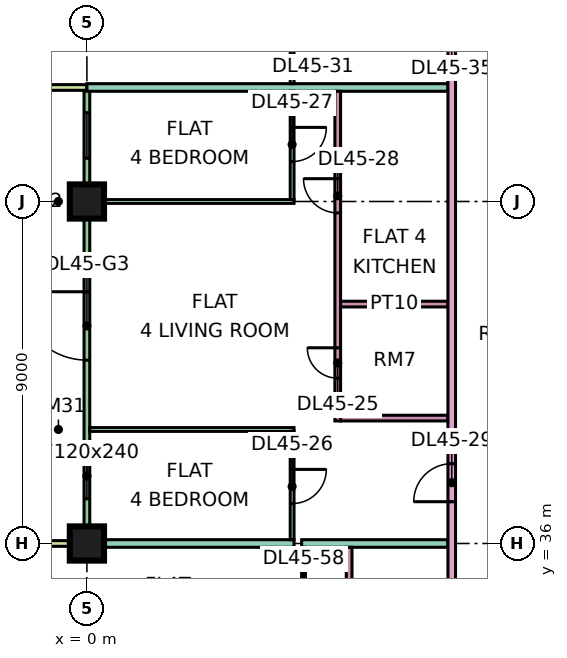
"""IFC4 building model, lengths in metres.
Left out: names, types, materials, properties, quantities, classifications, styles, units other than length and angle.
Written with IfcOpenShell. Run it as: python <this file> out.ifc"""

import sys

from ifc_helpers import new_model, si_unit, direction, frame, frame_2d, origin, origin_2d, place, context, subcontext, project, spatial, rectangle, extrude, element, fill, save


model = new_model("IFC4")
c1 = context("Model", 3, precision=1e-05, world=origin(), true_north=direction((0.0, 1.0)))
c2 = subcontext(c1, "Body", "Model", "MODEL_VIEW")
j1 = project(units=[si_unit("LENGTHUNIT", "METRE"), si_unit("PLANEANGLEUNIT", "RADIAN")], contexts=[c1])
p1 = place(None, origin())
s1 = spatial("IfcSite", under=j1, at=p1, CompositionType="ELEMENT")
p2 = place(p1, origin())
s2 = spatial("IfcBuilding", under=s1, at=p2, CompositionType="ELEMENT")
p3 = place(p2, frame((0.0, 0.0, 194.9)))
s3 = spatial("IfcBuildingStorey", under=s2, at=p3, CompositionType="ELEMENT", Elevation=194.9)
p4 = place(p3, frame((0.0, 36.0, 0.0), z_axis=(0.0, 0.0, 1.0), x_axis=(1.0, 0.0, 0.0)))
e1 = element("IfcColumn", 1, at=p4, inside=s3, PredefinedType="COLUMN", context=c2, shape_type="SweptSolid", body=[
    extrude(rectangle(XDim=0.9, YDim=0.9, at=origin_2d()), origin(), (0.0, 0.0, 1.0), 3.75),
])
p5 = place(p3, frame((0.0, 45.0, 0.0), z_axis=(0.0, 0.0, 1.0), x_axis=(1.0, 0.0, 0.0)))
e2 = element("IfcColumn", 2, at=p5, inside=s3, PredefinedType="COLUMN", context=c2, shape_type="SweptSolid", body=[
    extrude(rectangle(XDim=0.9, YDim=0.9, at=origin_2d()), origin(), (0.0, 0.0, 1.0), 3.75),
])
p6 = place(p3, frame((0.0, 47.925, 0.0), z_axis=(0.0, 0.0, 1.0), x_axis=(0.0, -1.0, 0.0)))
e3 = element("IfcWall", 3, at=p6, inside=s3, PredefinedType="SOLIDWALL", context=c2, shape_type="SweptSolid", body=[
    extrude(rectangle(XDim=11.85, YDim=0.15, at=frame_2d((5.925, 0.0))), origin(), (0.0, 0.0, 1.0), 3.35),
])
p7 = place(p6, frame((0.587, 0.0, 0.45)))
e4 = element("IfcOpeningElement", 4, at=p7, cuts=e3, PredefinedType="OPENING", context=c2, shape_type="SweptSolid", body=[
    extrude(rectangle(XDim=1.2, YDim=2.4, at=frame_2d((0.6, 1.2))), frame((0.0, 0.085, 0.0), z_axis=(0.0, -1.0, 0.0), x_axis=(1.0, 0.0, 0.0)), (0.0, 0.0, 1.0), 0.17),
])
p8 = place(p6, frame((5.3, 0.0, 0.0)))
e5 = element("IfcOpeningElement", 5, at=p8, cuts=e3, PredefinedType="OPENING", context=c2, shape_type="SweptSolid", body=[
    extrude(rectangle(XDim=1.8, YDim=2.4, at=frame_2d((0.9, 1.2))), frame((0.0, 0.085, 0.0), z_axis=(0.0, -1.0, 0.0), x_axis=(1.0, 0.0, 0.0)), (0.0, 0.0, 1.0), 0.17),
])
p9 = place(p6, frame((9.55, 0.0, 0.45)))
e6 = element("IfcOpeningElement", 6, at=p9, cuts=e3, PredefinedType="OPENING", context=c2, shape_type="SweptSolid", body=[
    extrude(rectangle(XDim=1.2, YDim=2.4, at=frame_2d((0.6, 1.2))), frame((0.0, 0.085, 0.0), z_axis=(0.0, -1.0, 0.0), x_axis=(1.0, 0.0, 0.0)), (0.0, 0.0, 1.0), 0.17),
])
for number, where, z_axis, x_axis in (
    (7, (-1.5, 48.0, 0.0), (0.0, 0.0, 1.0), (1.0, 0.0, 0.0)),
    (8, (-1.5, 36.0, 0.0), (0.0, 0.0, 1.0), (1.0, 0.0, 0.0)),
):
    element("IfcWall", number, at=place(p3, frame(where, z_axis=z_axis, x_axis=x_axis)), inside=s3, PredefinedType="SOLIDWALL", context=c2, shape_type="SweptSolid", body=[
        extrude(rectangle(XDim=1.5, YDim=0.15, at=frame_2d((0.75, 0.0))), origin(), (0.0, 0.0, 1.0), 3.35),
    ])
e9 = element("IfcWall", 9, at=p4, inside=s3, PredefinedType="PARTITIONING", context=c2, shape_type="SweptSolid", body=[
    extrude(rectangle(XDim=5.45, YDim=0.2, at=frame_2d((2.725, 0.0))), origin(), (0.0, 0.0, 1.0), 3.35),
])
p10 = place(p3, frame((0.0, 48.0, 0.0), z_axis=(0.0, 0.0, 1.0), x_axis=(1.0, 0.0, 0.0)))
e10 = element("IfcWall", 10, at=p10, inside=s3, PredefinedType="PARTITIONING", context=c2, shape_type="SweptSolid", body=[
    extrude(rectangle(XDim=9.5, YDim=0.2, at=frame_2d((4.75, 0.0))), origin(), (0.0, 0.0, 1.0), 3.35),
])
for number, where, z_axis, x_axis in (
    (11, (0.074, 39.0, 0.0), (0.0, 0.0, 1.0), (1.0, 0.0, 0.0)),
    (12, (0.074, 45.0, 0.0), (0.0, 0.0, 1.0), (1.0, 0.0, 0.0)),
):
    element("IfcWall", number, at=place(p3, frame(where, z_axis=z_axis, x_axis=x_axis)), inside=s3, PredefinedType="PARTITIONING", context=c2, shape_type="SweptSolid", body=[
        extrude(rectangle(XDim=5.376, YDim=0.1, at=frame_2d((2.688, 0.0))), origin(), (0.0, 0.0, 1.0), 3.35),
    ])
p11 = place(p3, frame((5.4, 36.1, 0.0), z_axis=(0.0, 0.0, 1.0), x_axis=(0.0, 1.0, 0.0)))
e13 = element("IfcWall", 13, at=p11, inside=s3, PredefinedType="PARTITIONING", context=c2, shape_type="SweptSolid", body=[
    extrude(rectangle(XDim=2.85, YDim=0.1, at=frame_2d((1.425, 0.0))), origin(), (0.0, 0.0, 1.0), 3.35),
])
p12 = place(p11, frame((0.95, 0.0, 0.0)))
e14 = element("IfcOpeningElement", 14, at=p12, cuts=e13, PredefinedType="OPENING", context=c2, shape_type="SweptSolid", body=[
    extrude(rectangle(XDim=0.9, YDim=2.1, at=frame_2d((0.45, 1.05))), frame((0.0, 0.06, 0.0), z_axis=(0.0, -1.0, 0.0), x_axis=(1.0, 0.0, 0.0)), (0.0, 0.0, 1.0), 0.12),
])
p13 = place(p3, frame((5.4, 45.05, 0.0), z_axis=(0.0, 0.0, 1.0), x_axis=(0.0, 1.0, 0.0)))
e15 = element("IfcWall", 15, at=p13, inside=s3, PredefinedType="PARTITIONING", context=c2, shape_type="SweptSolid", body=[
    extrude(rectangle(XDim=2.85, YDim=0.1, at=frame_2d((1.425, 0.0))), origin(), (0.0, 0.0, 1.0), 3.35),
])
p14 = place(p13, frame((1.0, 0.0, 0.0)))
e16 = element("IfcOpeningElement", 16, at=p14, cuts=e15, PredefinedType="OPENING", context=c2, shape_type="SweptSolid", body=[
    extrude(rectangle(XDim=0.9, YDim=2.1, at=frame_2d((0.45, 1.05))), frame((0.0, 0.06, 0.0), z_axis=(0.0, -1.0, 0.0), x_axis=(1.0, 0.0, 0.0)), (0.0, 0.0, 1.0), 0.12),
])
p15 = place(p3, frame((5.4, 48.1, 0.0), z_axis=(0.0, 0.0, 1.0), x_axis=(0.0, 1.0, 0.0)))
e17 = element("IfcWall", 17, at=p15, inside=s3, PredefinedType="PARTITIONING", context=c2, shape_type="SweptSolid", body=[
    extrude(rectangle(XDim=2.85, YDim=0.1, at=frame_2d((1.425, 0.0))), origin(), (0.0, 0.0, 1.0), 3.35),
])
p16 = place(p15, frame((0.95, 0.0, 0.0)))
e18 = element("IfcOpeningElement", 18, at=p16, cuts=e17, PredefinedType="OPENING", context=c2, shape_type="SweptSolid", body=[
    extrude(rectangle(XDim=0.9, YDim=2.1, at=frame_2d((0.45, 1.05))), frame((0.0, 0.06, 0.0), z_axis=(0.0, -1.0, 0.0), x_axis=(1.0, 0.0, 0.0)), (0.0, 0.0, 1.0), 0.12),
])
p17 = place(p3, frame((5.65, 36.0, 0.0), z_axis=(0.0, 0.0, 1.0), x_axis=(1.0, 0.0, 0.0)))
e19 = element("IfcWall", 19, at=p17, inside=s3, PredefinedType="PARTITIONING", context=c2, shape_type="SweptSolid", body=[
    extrude(rectangle(XDim=3.85, YDim=0.2, at=frame_2d((1.925, 0.0))), origin(), (0.0, 0.0, 1.0), 3.35),
])
p18 = place(p3, frame((5.7, 33.05, 0.0), z_axis=(0.0, 0.0, 1.0), x_axis=(0.0, 1.0, 0.0)))
e20 = element("IfcWall", 20, at=p18, inside=s3, PredefinedType="PARTITIONING", context=c2, shape_type="SweptSolid", body=[
    extrude(rectangle(XDim=2.85, YDim=0.1, at=frame_2d((1.425, 0.0))), origin(), (0.0, 0.0, 1.0), 3.35),
])
p19 = place(p18, frame((1.0, 0.0, 0.0)))
e21 = element("IfcOpeningElement", 21, at=p19, cuts=e20, PredefinedType="OPENING", context=c2, shape_type="SweptSolid", body=[
    extrude(rectangle(XDim=0.9, YDim=2.1, at=frame_2d((0.45, 1.05))), frame((0.0, 0.06, 0.0), z_axis=(0.0, -1.0, 0.0), x_axis=(1.0, 0.0, 0.0)), (0.0, 0.0, 1.0), 0.12),
])
p20 = place(p3, frame((6.6, 39.225, 0.0), z_axis=(0.0, 0.0, 1.0), x_axis=(0.0, 1.0, 0.0)))
e22 = element("IfcWall", 22, at=p20, inside=s3, PredefinedType="PARTITIONING", context=c2, shape_type="SweptSolid", body=[
    extrude(rectangle(XDim=8.675, YDim=0.15, at=frame_2d((4.337, 0.0))), origin(), (0.0, 0.0, 1.0), 3.35),
])
p21 = place(p20, frame((1.125, 0.0, 0.0)))
e23 = element("IfcOpeningElement", 23, at=p21, cuts=e22, PredefinedType="OPENING", context=c2, shape_type="SweptSolid", body=[
    extrude(rectangle(XDim=0.8, YDim=2.1, at=frame_2d((0.4, 1.05))), frame((0.0, 0.085, 0.0), z_axis=(0.0, -1.0, 0.0), x_axis=(1.0, 0.0, 0.0)), (0.0, 0.0, 1.0), 0.17),
])
p22 = place(p20, frame((5.475, 0.0, 0.0)))
e24 = element("IfcOpeningElement", 24, at=p22, cuts=e22, PredefinedType="OPENING", context=c2, shape_type="SweptSolid", body=[
    extrude(rectangle(XDim=0.9, YDim=2.1, at=frame_2d((0.45, 1.05))), frame((0.0, 0.085, 0.0), z_axis=(0.0, -1.0, 0.0), x_axis=(1.0, 0.0, 0.0)), (0.0, 0.0, 1.0), 0.17),
])
for number, where, z_axis, x_axis in (
    (25, (6.675, 39.3, 0.0), (0.0, 0.0, 1.0), (1.0, 0.0, 0.0)),
    (26, (6.675, 42.3, 0.0), (0.0, 0.0, 1.0), (1.0, 0.0, 0.0)),
):
    element("IfcWall", number, at=place(p3, frame(where, z_axis=z_axis, x_axis=x_axis)), inside=s3, PredefinedType="PARTITIONING", context=c2, shape_type="SweptSolid", body=[
        extrude(rectangle(XDim=2.825, YDim=0.15, at=frame_2d((1.413, 0.0))), origin(), (0.0, 0.0, 1.0), 3.35),
    ])
p23 = place(p3, frame((6.9, 27.225, 0.0), z_axis=(0.0, 0.0, 1.0), x_axis=(0.0, 1.0, 0.0)))
e27 = element("IfcWall", 27, at=p23, inside=s3, PredefinedType="PARTITIONING", context=c2, shape_type="SweptSolid", body=[
    extrude(rectangle(XDim=8.675, YDim=0.15, at=frame_2d((4.337, 0.0))), origin(), (0.0, 0.0, 1.0), 3.35),
])
p24 = place(p23, frame((1.125, 0.0, 0.0)))
e28 = element("IfcOpeningElement", 28, at=p24, cuts=e27, PredefinedType="OPENING", context=c2, shape_type="SweptSolid", body=[
    extrude(rectangle(XDim=0.8, YDim=2.1, at=frame_2d((0.4, 1.05))), frame((0.0, 0.085, 0.0), z_axis=(0.0, -1.0, 0.0), x_axis=(1.0, 0.0, 0.0)), (0.0, 0.0, 1.0), 0.17),
])
p25 = place(p23, frame((5.475, 0.0, 0.0)))
e29 = element("IfcOpeningElement", 29, at=p25, cuts=e27, PredefinedType="OPENING", context=c2, shape_type="SweptSolid", body=[
    extrude(rectangle(XDim=0.9, YDim=2.1, at=frame_2d((0.45, 1.05))), frame((0.0, 0.085, 0.0), z_axis=(0.0, -1.0, 0.0), x_axis=(1.0, 0.0, 0.0)), (0.0, 0.0, 1.0), 0.17),
])
p26 = place(p3, frame((9.6, 20.0, 0.0), z_axis=(0.0, 0.0, 1.0), x_axis=(0.0, 1.0, 0.0)))
e30 = element("IfcWall", 30, at=p26, inside=s3, PredefinedType="PARTITIONING", context=c2, shape_type="SweptSolid", body=[
    extrude(rectangle(XDim=44.35, YDim=0.2, at=frame_2d((22.175, 0.0))), origin(), (0.0, 0.0, 1.0), 3.35),
])
p27 = place(p26, frame((17.1, 0.0, 0.0)))
e31 = element("IfcOpeningElement", 31, at=p27, cuts=e30, PredefinedType="OPENING", context=c2, shape_type="SweptSolid", body=[
    extrude(rectangle(XDim=1.0, YDim=2.1, at=frame_2d((0.5, 1.05))), frame((0.0, 0.11, 0.0), z_axis=(0.0, -1.0, 0.0), x_axis=(1.0, 0.0, 0.0)), (0.0, 0.0, 1.0), 0.22),
])
p28 = place(p26, frame((29.1, 0.0, 0.0)))
e32 = element("IfcOpeningElement", 32, at=p28, cuts=e30, PredefinedType="OPENING", context=c2, shape_type="SweptSolid", body=[
    extrude(rectangle(XDim=1.0, YDim=2.1, at=frame_2d((0.5, 1.05))), frame((0.0, 0.11, 0.0), z_axis=(0.0, -1.0, 0.0), x_axis=(1.0, 0.0, 0.0)), (0.0, 0.0, 1.0), 0.22),
])
p29 = place(p26, frame((0.6, 0.0, 0.0)))
e33 = element("IfcOpeningElement", 33, at=p29, cuts=e30, PredefinedType="OPENING", context=c2, shape_type="SweptSolid", body=[
    extrude(rectangle(XDim=1.2, YDim=2.1, at=frame_2d((0.6, 1.05))), frame((0.0, 0.11, 0.0), z_axis=(0.0, -1.0, 0.0), x_axis=(1.0, 0.0, 0.0)), (0.0, 0.0, 1.0), 0.22),
])
p30 = place(p26, frame((4.35, 0.0, 0.0)))
e34 = element("IfcOpeningElement", 34, at=p30, cuts=e30, PredefinedType="OPENING", context=c2, shape_type="SweptSolid", body=[
    extrude(rectangle(XDim=1.0, YDim=2.1, at=frame_2d((0.5, 1.05))), frame((0.0, 0.11, 0.0), z_axis=(0.0, -1.0, 0.0), x_axis=(1.0, 0.0, 0.0)), (0.0, 0.0, 1.0), 0.22),
])
p31 = place(p7, origin())
e35 = element("IfcWindow", 35, at=p31, inside=s3, PartitioningType="SINGLE_PANEL", PredefinedType="WINDOW", context=c2, shape_type="SweptSolid", body=[
    extrude(rectangle(XDim=1.2, YDim=2.4, at=frame_2d((0.6, 1.2))), frame((0.0, 0.03, 0.0), z_axis=(0.0, -1.0, 0.0), x_axis=(1.0, 0.0, 0.0)), (0.0, 0.0, 1.0), 0.06),
])
fill(e4, e35)
p32 = place(p8, frame((1.8, 0.0, 0.0), z_axis=(0.0, 0.0, 1.0), x_axis=(-1.0, 0.0, 0.0)))
e36 = element("IfcDoor", 36, at=p32, inside=s3, OperationType="DOUBLE_DOOR_SINGLE_SWING", PredefinedType="DOOR", context=c2, shape_type="SweptSolid", body=[
    extrude(rectangle(XDim=1.8, YDim=2.4, at=frame_2d((0.9, 1.2))), frame((0.0, 0.025, 0.0), z_axis=(0.0, -1.0, 0.0), x_axis=(1.0, 0.0, 0.0)), (0.0, 0.0, 1.0), 0.05),
])
fill(e5, e36)
p33 = place(p9, origin())
e37 = element("IfcWindow", 37, at=p33, inside=s3, PartitioningType="SINGLE_PANEL", PredefinedType="WINDOW", context=c2, shape_type="SweptSolid", body=[
    extrude(rectangle(XDim=1.2, YDim=2.4, at=frame_2d((0.6, 1.2))), frame((0.0, 0.03, 0.0), z_axis=(0.0, -1.0, 0.0), x_axis=(1.0, 0.0, 0.0)), (0.0, 0.0, 1.0), 0.06),
])
fill(e6, e37)
p34 = place(p21, frame((0.8, 0.0, 0.0), z_axis=(0.0, 0.0, 1.0), x_axis=(-1.0, 0.0, 0.0)))
e38 = element("IfcDoor", 38, at=p34, inside=s3, OperationType="SINGLE_SWING_RIGHT", PredefinedType="DOOR", context=c2, shape_type="SweptSolid", body=[
    extrude(rectangle(XDim=0.8, YDim=2.1, at=frame_2d((0.4, 1.05))), frame((0.0, 0.025, 0.0), z_axis=(0.0, -1.0, 0.0), x_axis=(1.0, 0.0, 0.0)), (0.0, 0.0, 1.0), 0.05),
])
fill(e23, e38)
p35 = place(p12, origin())
e39 = element("IfcDoor", 39, at=p35, inside=s3, OperationType="SINGLE_SWING_RIGHT", PredefinedType="DOOR", context=c2, shape_type="SweptSolid", body=[
    extrude(rectangle(XDim=0.9, YDim=2.1, at=frame_2d((0.45, 1.05))), frame((0.0, 0.025, 0.0), z_axis=(0.0, -1.0, 0.0), x_axis=(1.0, 0.0, 0.0)), (0.0, 0.0, 1.0), 0.05),
])
fill(e14, e39)
p36 = place(p14, origin())
e40 = element("IfcDoor", 40, at=p36, inside=s3, OperationType="SINGLE_SWING_RIGHT", PredefinedType="DOOR", context=c2, shape_type="SweptSolid", body=[
    extrude(rectangle(XDim=0.9, YDim=2.1, at=frame_2d((0.45, 1.05))), frame((0.0, 0.025, 0.0), z_axis=(0.0, -1.0, 0.0), x_axis=(1.0, 0.0, 0.0)), (0.0, 0.0, 1.0), 0.05),
])
fill(e16, e40)
p37 = place(p22, frame((0.9, 0.0, 0.0), z_axis=(0.0, 0.0, 1.0), x_axis=(-1.0, 0.0, 0.0)))
e41 = element("IfcDoor", 41, at=p37, inside=s3, OperationType="SINGLE_SWING_RIGHT", PredefinedType="DOOR", context=c2, shape_type="SweptSolid", body=[
    extrude(rectangle(XDim=0.9, YDim=2.1, at=frame_2d((0.45, 1.05))), frame((0.0, 0.025, 0.0), z_axis=(0.0, -1.0, 0.0), x_axis=(1.0, 0.0, 0.0)), (0.0, 0.0, 1.0), 0.05),
])
fill(e24, e41)
p38 = place(p27, origin())
e42 = element("IfcDoor", 42, at=p38, inside=s3, OperationType="SINGLE_SWING_LEFT", PredefinedType="DOOR", context=c2, shape_type="SweptSolid", body=[
    extrude(rectangle(XDim=1.0, YDim=2.1, at=frame_2d((0.5, 1.05))), frame((0.0, 0.025, 0.0), z_axis=(0.0, -1.0, 0.0), x_axis=(1.0, 0.0, 0.0)), (0.0, 0.0, 1.0), 0.05),
])
fill(e31, e42)
save(model, sys.argv[1])
